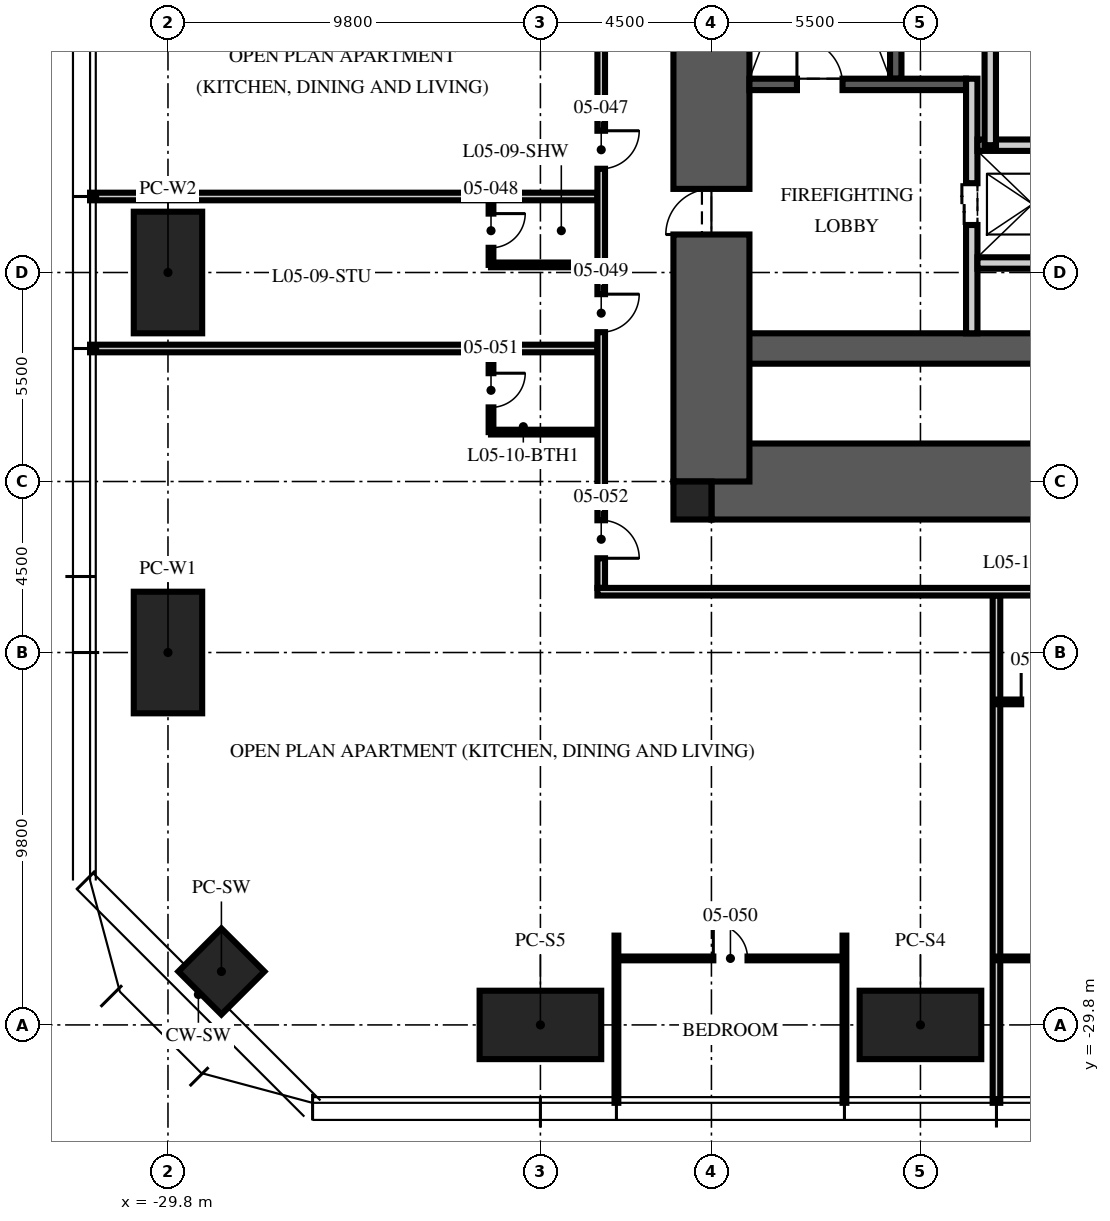
"""IFC4 building model, lengths in metres.
Left out: names, types, materials, properties, quantities, classifications, styles, units other than length and angle.
Written with IfcOpenShell. Run it as: python <this file> out.ifc"""

import sys

from ifc_helpers import new_model, si_unit, direction, frame, frame_2d, origin, origin_2d, place, context, subcontext, project, spatial, rectangle, hollow_rectangle, extrude, element, fill, save


model = new_model("IFC4")
c1 = context("Model", 3, precision=1e-05, world=origin(), true_north=direction((0.0, 1.0)))
c2 = subcontext(c1, "Body", "Model", "MODEL_VIEW")
j1 = project(units=[si_unit("LENGTHUNIT", "METRE"), si_unit("PLANEANGLEUNIT", "RADIAN")], contexts=[c1])
p1 = place(None, origin())
s1 = spatial("IfcSite", under=j1, at=p1, CompositionType="ELEMENT")
p2 = place(p1, origin())
s2 = spatial("IfcBuilding", under=s1, at=p2, CompositionType="ELEMENT")
p3 = place(p2, frame((0.0, 0.0, 24.75)))
s3 = spatial("IfcBuildingStorey", under=s2, at=p3, CompositionType="ELEMENT", Elevation=24.75)
p4 = place(p3, frame((-15.5, -15.5, -0.25), z_axis=(0.0, 0.0, 1.0), x_axis=(1.0, 0.0, 0.0)))
e1 = element("IfcWall", 1, at=p4, inside=s3, PredefinedType="SHEAR", context=c2, shape_type="SweptSolid", body=[
    extrude(rectangle(XDim=31.0, YDim=2.0, at=frame_2d((15.5, 0.0))), origin(), (0.0, 0.0, 1.0), 3.75),
])
p5 = place(p3, frame((-15.5, -12.0, -0.25), z_axis=(0.0, 0.0, 1.0), x_axis=(1.0, 0.0, 0.0)))
e2 = element("IfcWall", 2, at=p5, inside=s3, PredefinedType="SHEAR", context=c2, shape_type="SweptSolid", body=[
    extrude(rectangle(XDim=31.0, YDim=0.8, at=frame_2d((15.5, 0.0))), origin(), (0.0, 0.0, 1.0), 3.75),
])
p6 = place(p3, frame((-15.5, -15.5, -0.25), z_axis=(0.0, 0.0, 1.0), x_axis=(0.0, 1.0, 0.0)))
e3 = element("IfcWall", 3, at=p6, inside=s3, PredefinedType="SHEAR", context=c2, shape_type="SweptSolid", body=[
    extrude(rectangle(XDim=31.0, YDim=2.0, at=frame_2d((15.5, 0.0))), origin(), (0.0, 0.0, 1.0), 3.75),
])
p7 = place(p6, frame((6.5, 0.0, 0.25)))
e4 = element("IfcOpeningElement", 4, at=p7, cuts=e3, PredefinedType="OPENING", context=c2, shape_type="SweptSolid", body=[
    extrude(rectangle(XDim=1.2, YDim=2.1, at=frame_2d((0.6, 1.05))), frame((0.0, 1.01, 0.0), z_axis=(0.0, -1.0, 0.0), x_axis=(1.0, 0.0, 0.0)), (0.0, 0.0, 1.0), 2.02),
])
p8 = place(p6, frame((23.0, 0.0, 0.25)))
e5 = element("IfcOpeningElement", 5, at=p8, cuts=e3, PredefinedType="OPENING", context=c2, shape_type="SweptSolid", body=[
    extrude(rectangle(XDim=1.8, YDim=2.1, at=frame_2d((0.9, 1.05))), frame((0.0, 1.01, 0.0), z_axis=(0.0, -1.0, 0.0), x_axis=(1.0, 0.0, 0.0)), (0.0, 0.0, 1.0), 2.02),
])
p9 = place(p3, frame((-16.0, -16.0, -0.25), z_axis=(0.0, 0.0, 1.0), x_axis=(1.0, 0.0, 0.0)))
e6 = element("IfcColumn", 6, at=p9, inside=s3, PredefinedType="COLUMN", context=c2, shape_type="SweptSolid", body=[
    extrude(rectangle(XDim=1.0, YDim=1.0, at=origin_2d()), origin(), (0.0, 0.0, 1.0), 3.75),
])
for number, where, z_axis, x_axis in (
    (7, (-10.0, -29.8, 0.0), (0.0, 0.0, 1.0), (1.0, 0.0, 0.0)),
    (8, (-20.0, -29.8, 0.0), (0.0, 0.0, 1.0), (1.0, 0.0, 0.0)),
    (9, (-29.8, -20.0, 0.0), (0.0, 0.0, 1.0), (0.0, 1.0, 0.0)),
    (10, (-29.8, -10.0, 0.0), (0.0, 0.0, 1.0), (0.0, 1.0, 0.0)),
):
    element("IfcColumn", number, at=place(p3, frame(where, z_axis=z_axis, x_axis=x_axis)), inside=s3, PredefinedType="COLUMN", context=c2, shape_type="SweptSolid", body=[
        extrude(hollow_rectangle(XDim=3.2, YDim=1.8, WallThickness=0.2, at=origin_2d()), origin(), (0.0, 0.0, 1.0), 3.75),
    ])
p10 = place(p3, frame((-28.394, -28.394, 0.0), z_axis=(0.0, 0.0, 1.0), x_axis=(0.707106781187, -0.707106781187, 0.0)))
e11 = element("IfcColumn", 11, at=p10, inside=s3, PredefinedType="COLUMN", context=c2, shape_type="SweptSolid", body=[
    extrude(hollow_rectangle(XDim=1.6, YDim=1.6, WallThickness=0.1, at=origin_2d()), origin(), (0.0, 0.0, 1.0), 3.75),
])
p11 = place(p3, frame((-10.65, -4.9, 0.0), z_axis=(0.0, 0.0, 1.0), x_axis=(0.0, 1.0, 0.0)))
e12 = element("IfcWall", 12, at=p11, inside=s3, PredefinedType="SOLIDWALL", context=c2, shape_type="SweptSolid", body=[
    extrude(rectangle(XDim=10.1, YDim=0.3, at=frame_2d((5.05, 0.0))), origin(), (0.0, 0.0, 1.0), 3.5),
])
p12 = place(p3, frame((-14.5, -5.05, 0.0), z_axis=(0.0, 0.0, 1.0), x_axis=(1.0, 0.0, 0.0)))
e13 = element("IfcWall", 13, at=p12, inside=s3, PredefinedType="SOLIDWALL", context=c2, shape_type="SweptSolid", body=[
    extrude(rectangle(XDim=5.7, YDim=0.3, at=frame_2d((2.85, 0.0))), origin(), (0.0, 0.0, 1.0), 3.5),
])
p13 = place(p12, frame((1.25, 0.0, 0.0)))
e14 = element("IfcOpeningElement", 14, at=p13, cuts=e13, PredefinedType="OPENING", context=c2, shape_type="SweptSolid", body=[
    extrude(rectangle(XDim=1.2, YDim=2.1, at=frame_2d((0.6, 1.05))), frame((0.0, 0.16, 0.0), z_axis=(0.0, -1.0, 0.0), x_axis=(1.0, 0.0, 0.0)), (0.0, 0.0, 1.0), 0.32),
])
p14 = place(p3, frame((-8.65, -11.6, 0.0), z_axis=(0.0, 0.0, 1.0), x_axis=(0.0, 1.0, 0.0)))
e15 = element("IfcWall", 15, at=p14, inside=s3, PredefinedType="PARTITIONING", context=c2, shape_type="SweptSolid", body=[
    extrude(rectangle(XDim=6.7, YDim=0.3, at=frame_2d((3.35, 0.0))), origin(), (0.0, 0.0, 1.0), 3.5),
])
p15 = place(p14, frame((2.85, 0.0, 0.0)))
e16 = element("IfcOpeningElement", 16, at=p15, cuts=e15, PredefinedType="OPENING", context=c2, shape_type="SweptSolid", body=[
    extrude(rectangle(XDim=1.1, YDim=2.1, at=frame_2d((0.55, 1.05))), frame((0.0, 0.16, 0.0), z_axis=(0.0, -1.0, 0.0), x_axis=(1.0, 0.0, 0.0)), (0.0, 0.0, 1.0), 0.32),
])
p16 = place(p3, frame((-8.5, -6.65, 0.0), z_axis=(0.0, 0.0, 1.0), x_axis=(1.0, 0.0, 0.0)))
e17 = element("IfcWall", 17, at=p16, inside=s3, PredefinedType="PARTITIONING", context=c2, shape_type="SweptSolid", body=[
    extrude(rectangle(XDim=17.0, YDim=0.3, at=frame_2d((8.5, 0.0))), origin(), (0.0, 0.0, 1.0), 3.5),
])
p17 = place(p16, frame((7.8, 0.0, 0.0)))
e18 = element("IfcOpeningElement", 18, at=p17, cuts=e17, PredefinedType="OPENING", context=c2, shape_type="SweptSolid", body=[
    extrude(rectangle(XDim=1.3, YDim=2.4, at=frame_2d((0.65, 1.2))), frame((0.0, 0.16, 0.0), z_axis=(0.0, -1.0, 0.0), x_axis=(1.0, 0.0, 0.0)), (0.0, 0.0, 1.0), 0.32),
])
p18 = place(p16, frame((5.65, 0.0, 0.0)))
e19 = element("IfcOpeningElement", 19, at=p18, cuts=e17, PredefinedType="OPENING", context=c2, shape_type="SweptSolid", body=[
    extrude(rectangle(XDim=0.9, YDim=2.1, at=frame_2d((0.45, 1.05))), frame((0.0, 0.16, 0.0), z_axis=(0.0, -1.0, 0.0), x_axis=(1.0, 0.0, 0.0)), (0.0, 0.0, 1.0), 0.32),
])
p19 = place(p16, frame((10.4, 0.0, 0.0)))
e20 = element("IfcOpeningElement", 20, at=p19, cuts=e17, PredefinedType="OPENING", context=c2, shape_type="SweptSolid", body=[
    extrude(rectangle(XDim=0.9, YDim=2.1, at=frame_2d((0.45, 1.05))), frame((0.0, 0.16, 0.0), z_axis=(0.0, -1.0, 0.0), x_axis=(1.0, 0.0, 0.0)), (0.0, 0.0, 1.0), 0.32),
])
p20 = place(p3, frame((-8.5, -9.75, 0.0), z_axis=(0.0, 0.0, 1.0), x_axis=(1.0, 0.0, 0.0)))
e21 = element("IfcWall", 21, at=p20, inside=s3, PredefinedType="PARTITIONING", context=c2, shape_type="SweptSolid", body=[
    extrude(rectangle(XDim=2.9, YDim=0.3, at=frame_2d((1.45, 0.0))), origin(), (0.0, 0.0, 1.0), 3.5),
])
p21 = place(p3, frame((-8.163, -6.65, 0.0), z_axis=(0.0, 0.0, 1.0), x_axis=(0.0, 1.0, 0.0)))
e22 = element("IfcWall", 22, at=p21, inside=s3, PredefinedType="PARTITIONING", context=c2, shape_type="SweptSolid", body=[
    extrude(rectangle(XDim=7.45, YDim=0.3, at=frame_2d((3.725, 0.0))), origin(), (0.0, 0.0, 1.0), 3.5),
])
for number, where, z_axis, x_axis in (
    (23, (-18.5, -8.0, 0.0), (0.0, 0.0, 1.0), (-1.0, 0.0, 0.0)),
    (24, (-18.5, -12.0, 0.0), (0.0, 0.0, 1.0), (-1.0, 0.0, 0.0)),
):
    element("IfcWall", number, at=place(p3, frame(where, z_axis=z_axis, x_axis=x_axis)), inside=s3, PredefinedType="PARTITIONING", context=c2, shape_type="SweptSolid", body=[
        extrude(rectangle(XDim=13.35, YDim=0.2, at=frame_2d((6.675, 0.0))), origin(), (0.0, 0.0, 1.0), 2.71),
    ])
for number, where, z_axis, x_axis in (
    (25, (-18.0, -27.45, 0.0), (0.0, 0.0, 1.0), (0.0, -1.0, 0.0)),
    (26, (-12.0, -27.45, 0.0), (0.0, 0.0, 1.0), (0.0, -1.0, 0.0)),
):
    element("IfcWall", number, at=place(p3, frame(where, z_axis=z_axis, x_axis=x_axis)), inside=s3, PredefinedType="PARTITIONING", context=c2, shape_type="SweptSolid", body=[
        extrude(rectangle(XDim=4.4, YDim=0.1, at=frame_2d((2.2, 0.0))), origin(), (0.0, 0.0, 1.0), 2.71),
    ])
p22 = place(p3, frame((-8.0, -18.5, 0.0), z_axis=(0.0, 0.0, 1.0), x_axis=(0.0, -1.0, 0.0)))
e27 = element("IfcWall", 27, at=p22, inside=s3, PredefinedType="PARTITIONING", context=c2, shape_type="SweptSolid", body=[
    extrude(rectangle(XDim=13.35, YDim=0.2, at=frame_2d((6.675, 0.0))), origin(), (0.0, 0.0, 1.0), 2.71),
])
p23 = place(p3, frame((-21.3, -8.0, 0.0), z_axis=(0.0, 0.0, 1.0), x_axis=(0.0, -1.0, 0.0)))
e28 = element("IfcWall", 28, at=p23, inside=s3, PredefinedType="PARTITIONING", context=c2, shape_type="SweptSolid", body=[
    extrude(rectangle(XDim=1.8, YDim=0.125, at=frame_2d((0.9, 0.0))), origin(), (0.0, 0.0, 1.0), 3.5),
])
p24 = place(p23, frame((0.45, 0.0, 0.0)))
e29 = element("IfcOpeningElement", 29, at=p24, cuts=e28, PredefinedType="OPENING", context=c2, shape_type="SweptSolid", body=[
    extrude(rectangle(XDim=0.9, YDim=2.1, at=frame_2d((0.45, 1.05))), frame((0.0, 0.073, 0.0), z_axis=(0.0, -1.0, 0.0), x_axis=(1.0, 0.0, 0.0)), (0.0, 0.0, 1.0), 0.145),
])
p25 = place(p3, frame((-18.5, -9.8, 0.0), z_axis=(0.0, 0.0, 1.0), x_axis=(-1.0, 0.0, 0.0)))
e30 = element("IfcWall", 30, at=p25, inside=s3, PredefinedType="PARTITIONING", context=c2, shape_type="SweptSolid", body=[
    extrude(rectangle(XDim=2.8, YDim=0.125, at=frame_2d((1.4, 0.0))), origin(), (0.0, 0.0, 1.0), 2.492),
])
p26 = place(p3, frame((-18.0, -28.05, 0.0), z_axis=(0.0, 0.0, 1.0), x_axis=(1.0, 0.0, 0.0)))
e31 = element("IfcWall", 31, at=p26, inside=s3, PredefinedType="PARTITIONING", context=c2, shape_type="SweptSolid", body=[
    extrude(rectangle(XDim=6.0, YDim=0.1, at=frame_2d((3.0, 0.0))), origin(), (0.0, 0.0, 1.0), 2.61),
])
p27 = place(p26, frame((2.55, 0.0, 0.0)))
e32 = element("IfcOpeningElement", 32, at=p27, cuts=e31, PredefinedType="OPENING", context=c2, shape_type="SweptSolid", body=[
    extrude(rectangle(XDim=0.9, YDim=2.1, at=frame_2d((0.45, 1.05))), frame((0.0, 0.06, 0.0), z_axis=(0.0, -1.0, 0.0), x_axis=(1.0, 0.0, 0.0)), (0.0, 0.0, 1.0), 0.12),
])
p28 = place(p3, frame((-21.3, -12.0, 0.0), z_axis=(0.0, 0.0, 1.0), x_axis=(0.0, -1.0, 0.0)))
e33 = element("IfcWall", 33, at=p28, inside=s3, PredefinedType="PARTITIONING", context=c2, shape_type="SweptSolid", body=[
    extrude(rectangle(XDim=2.2, YDim=0.125, at=frame_2d((1.1, 0.0))), origin(), (0.0, 0.0, 1.0), 3.5),
])
p29 = place(p28, frame((0.65, 0.0, 0.0)))
e34 = element("IfcOpeningElement", 34, at=p29, cuts=e33, PredefinedType="OPENING", context=c2, shape_type="SweptSolid", body=[
    extrude(rectangle(XDim=0.9, YDim=2.1, at=frame_2d((0.45, 1.05))), frame((0.0, 0.073, 0.0), z_axis=(0.0, -1.0, 0.0), x_axis=(1.0, 0.0, 0.0)), (0.0, 0.0, 1.0), 0.145),
])
p30 = place(p3, frame((-18.5, -14.2, 0.0), z_axis=(0.0, 0.0, 1.0), x_axis=(-1.0, 0.0, 0.0)))
e35 = element("IfcWall", 35, at=p30, inside=s3, PredefinedType="PARTITIONING", context=c2, shape_type="SweptSolid", body=[
    extrude(rectangle(XDim=2.8, YDim=0.125, at=frame_2d((1.4, 0.0))), origin(), (0.0, 0.0, 1.0), 3.5),
])
p31 = place(p3, frame((-8.0, -28.05, 0.0), z_axis=(0.0, 0.0, 1.0), x_axis=(1.0, 0.0, 0.0)))
e36 = element("IfcWall", 36, at=p31, inside=s3, PredefinedType="PARTITIONING", context=c2, shape_type="SweptSolid", body=[
    extrude(rectangle(XDim=6.0, YDim=0.1, at=frame_2d((3.0, 0.0))), origin(), (0.0, 0.0, 1.0), 2.61),
])
p32 = place(p31, frame((2.55, 0.0, 0.0)))
e37 = element("IfcOpeningElement", 37, at=p32, cuts=e36, PredefinedType="OPENING", context=c2, shape_type="SweptSolid", body=[
    extrude(rectangle(XDim=0.9, YDim=2.1, at=frame_2d((0.45, 1.05))), frame((0.0, 0.06, 0.0), z_axis=(0.0, -1.0, 0.0), x_axis=(1.0, 0.0, 0.0)), (0.0, 0.0, 1.0), 0.12),
])
p33 = place(p3, frame((-8.0, -21.3, 0.0), z_axis=(0.0, 0.0, 1.0), x_axis=(1.0, 0.0, 0.0)))
e38 = element("IfcWall", 38, at=p33, inside=s3, PredefinedType="PARTITIONING", context=c2, shape_type="SweptSolid", body=[
    extrude(rectangle(XDim=2.2, YDim=0.125, at=frame_2d((1.1, 0.0))), origin(), (0.0, 0.0, 1.0), 3.5),
])
p34 = place(p33, frame((0.65, 0.0, 0.0)))
e39 = element("IfcOpeningElement", 39, at=p34, cuts=e38, PredefinedType="OPENING", context=c2, shape_type="SweptSolid", body=[
    extrude(rectangle(XDim=0.9, YDim=2.1, at=frame_2d((0.45, 1.05))), frame((0.0, 0.073, 0.0), z_axis=(0.0, -1.0, 0.0), x_axis=(1.0, 0.0, 0.0)), (0.0, 0.0, 1.0), 0.145),
])
p35 = place(p3, frame((-18.4, 18.3, 0.0), z_axis=(0.0, 0.0, 1.0), x_axis=(0.0, -1.0, 0.0)))
e40 = element("IfcWall", 40, at=p35, inside=s3, PredefinedType="PARTITIONING", context=c2, shape_type="SweptSolid", body=[
    extrude(rectangle(XDim=36.6, YDim=0.2, at=frame_2d((18.3, 0.0))), origin(), (0.0, 0.0, 1.0), 2.3),
])
p36 = place(p35, frame((8.57, 0.0, 0.0)))
e41 = element("IfcOpeningElement", 41, at=p36, cuts=e40, PredefinedType="OPENING", context=c2, shape_type="SweptSolid", body=[
    extrude(rectangle(XDim=1.0, YDim=2.2, at=frame_2d((0.5, 1.1))), frame((0.0, 0.11, 0.0), z_axis=(0.0, -1.0, 0.0), x_axis=(1.0, 0.0, 0.0)), (0.0, 0.0, 1.0), 0.22),
])
p37 = place(p35, frame((24.57, 0.0, 0.0)))
e42 = element("IfcOpeningElement", 42, at=p37, cuts=e40, PredefinedType="OPENING", context=c2, shape_type="SweptSolid", body=[
    extrude(rectangle(XDim=1.0, YDim=2.2, at=frame_2d((0.5, 1.1))), frame((0.0, 0.11, 0.0), z_axis=(0.0, -1.0, 0.0), x_axis=(1.0, 0.0, 0.0)), (0.0, 0.0, 1.0), 0.22),
])
p38 = place(p35, frame((28.87, 0.0, 0.0)))
e43 = element("IfcOpeningElement", 43, at=p38, cuts=e40, PredefinedType="OPENING", context=c2, shape_type="SweptSolid", body=[
    extrude(rectangle(XDim=1.0, YDim=2.2, at=frame_2d((0.5, 1.1))), frame((0.0, 0.11, 0.0), z_axis=(0.0, -1.0, 0.0), x_axis=(1.0, 0.0, 0.0)), (0.0, 0.0, 1.0), 0.22),
])
p39 = place(p35, frame((34.82, 0.0, 0.0)))
e44 = element("IfcOpeningElement", 44, at=p39, cuts=e40, PredefinedType="OPENING", context=c2, shape_type="SweptSolid", body=[
    extrude(rectangle(XDim=1.0, YDim=2.2, at=frame_2d((0.5, 1.1))), frame((0.0, 0.11, 0.0), z_axis=(0.0, -1.0, 0.0), x_axis=(1.0, 0.0, 0.0)), (0.0, 0.0, 1.0), 0.22),
])
p40 = place(p3, frame((18.5, -18.4, 0.0), z_axis=(0.0, 0.0, 1.0), x_axis=(-1.0, 0.0, 0.0)))
e45 = element("IfcWall", 45, at=p40, inside=s3, PredefinedType="PARTITIONING", context=c2, shape_type="SweptSolid", body=[
    extrude(rectangle(XDim=37.0, YDim=0.2, at=frame_2d((18.5, 0.0))), origin(), (0.0, 0.0, 1.0), 2.3),
])
p41 = place(p40, frame((17.23, 0.0, 0.0)))
e46 = element("IfcOpeningElement", 46, at=p41, cuts=e45, PredefinedType="OPENING", context=c2, shape_type="SweptSolid", body=[
    extrude(rectangle(XDim=1.0, YDim=2.2, at=frame_2d((0.5, 1.1))), frame((0.0, 0.11, 0.0), z_axis=(0.0, -1.0, 0.0), x_axis=(1.0, 0.0, 0.0)), (0.0, 0.0, 1.0), 0.22),
])
p42 = place(p40, frame((7.23, 0.0, 0.0)))
e47 = element("IfcOpeningElement", 47, at=p42, cuts=e45, PredefinedType="OPENING", context=c2, shape_type="SweptSolid", body=[
    extrude(rectangle(XDim=1.0, YDim=2.2, at=frame_2d((0.5, 1.1))), frame((0.0, 0.11, 0.0), z_axis=(0.0, -1.0, 0.0), x_axis=(1.0, 0.0, 0.0)), (0.0, 0.0, 1.0), 0.22),
])
p43 = place(p40, frame((0.93, 0.0, 0.0)))
e48 = element("IfcOpeningElement", 48, at=p43, cuts=e45, PredefinedType="OPENING", context=c2, shape_type="SweptSolid", body=[
    extrude(rectangle(XDim=1.0, YDim=2.2, at=frame_2d((0.5, 1.1))), frame((0.0, 0.11, 0.0), z_axis=(0.0, -1.0, 0.0), x_axis=(1.0, 0.0, 0.0)), (0.0, 0.0, 1.0), 0.22),
])
p44 = place(p13, origin())
e49 = element("IfcDoor", 49, at=p44, inside=s3, OperationType="SINGLE_SWING_LEFT", PredefinedType="DOOR", context=c2, shape_type="SweptSolid", body=[
    extrude(rectangle(XDim=1.2, YDim=2.1, at=frame_2d((0.6, 1.05))), frame((0.0, 0.025, 0.0), z_axis=(0.0, -1.0, 0.0), x_axis=(1.0, 0.0, 0.0)), (0.0, 0.0, 1.0), 0.05),
])
fill(e14, e49)
p45 = place(p7, origin())
e50 = element("IfcDoor", 50, at=p45, inside=s3, OperationType="SINGLE_SWING_LEFT", PredefinedType="DOOR", context=c2, shape_type="SweptSolid", body=[
    extrude(rectangle(XDim=1.2, YDim=2.1, at=frame_2d((0.6, 1.05))), frame((0.0, 0.025, 0.0), z_axis=(0.0, -1.0, 0.0), x_axis=(1.0, 0.0, 0.0)), (0.0, 0.0, 1.0), 0.05),
])
fill(e4, e50)
p46 = place(p15, origin())
e51 = element("IfcDoor", 51, at=p46, inside=s3, OperationType="DOUBLE_DOOR_SLIDING", PredefinedType="DOOR", context=c2, shape_type="SweptSolid", body=[
    extrude(rectangle(XDim=1.1, YDim=2.1, at=frame_2d((0.55, 1.05))), frame((0.0, 0.025, 0.0), z_axis=(0.0, -1.0, 0.0), x_axis=(1.0, 0.0, 0.0)), (0.0, 0.0, 1.0), 0.05),
])
fill(e16, e51)
p47 = place(p37, origin())
e52 = element("IfcDoor", 52, at=p47, inside=s3, OperationType="SINGLE_SWING_LEFT", PredefinedType="DOOR", context=c2, shape_type="SweptSolid", body=[
    extrude(rectangle(XDim=1.0, YDim=2.2, at=frame_2d((0.5, 1.1))), frame((0.0, 0.025, 0.0), z_axis=(0.0, -1.0, 0.0), x_axis=(1.0, 0.0, 0.0)), (0.0, 0.0, 1.0), 0.05),
])
fill(e42, e52)
p48 = place(p24, origin())
e53 = element("IfcDoor", 53, at=p48, inside=s3, OperationType="SINGLE_SWING_LEFT", PredefinedType="DOOR", context=c2, shape_type="SweptSolid", body=[
    extrude(rectangle(XDim=0.9, YDim=2.1, at=frame_2d((0.45, 1.05))), frame((0.0, 0.025, 0.0), z_axis=(0.0, -1.0, 0.0), x_axis=(1.0, 0.0, 0.0)), (0.0, 0.0, 1.0), 0.05),
])
fill(e29, e53)
p49 = place(p38, origin())
e54 = element("IfcDoor", 54, at=p49, inside=s3, OperationType="SINGLE_SWING_LEFT", PredefinedType="DOOR", context=c2, shape_type="SweptSolid", body=[
    extrude(rectangle(XDim=1.0, YDim=2.2, at=frame_2d((0.5, 1.1))), frame((0.0, 0.025, 0.0), z_axis=(0.0, -1.0, 0.0), x_axis=(1.0, 0.0, 0.0)), (0.0, 0.0, 1.0), 0.05),
])
fill(e43, e54)
p50 = place(p27, origin())
e55 = element("IfcDoor", 55, at=p50, inside=s3, OperationType="SINGLE_SWING_LEFT", PredefinedType="DOOR", context=c2, shape_type="SweptSolid", body=[
    extrude(rectangle(XDim=0.9, YDim=2.1, at=frame_2d((0.45, 1.05))), frame((0.0, 0.025, 0.0), z_axis=(0.0, -1.0, 0.0), x_axis=(1.0, 0.0, 0.0)), (0.0, 0.0, 1.0), 0.05),
])
fill(e32, e55)
p51 = place(p29, origin())
e56 = element("IfcDoor", 56, at=p51, inside=s3, OperationType="SINGLE_SWING_LEFT", PredefinedType="DOOR", context=c2, shape_type="SweptSolid", body=[
    extrude(rectangle(XDim=0.9, YDim=2.1, at=frame_2d((0.45, 1.05))), frame((0.0, 0.025, 0.0), z_axis=(0.0, -1.0, 0.0), x_axis=(1.0, 0.0, 0.0)), (0.0, 0.0, 1.0), 0.05),
])
fill(e34, e56)
p52 = place(p39, origin())
e57 = element("IfcDoor", 57, at=p52, inside=s3, OperationType="SINGLE_SWING_RIGHT", PredefinedType="DOOR", context=c2, shape_type="SweptSolid", body=[
    extrude(rectangle(XDim=1.0, YDim=2.2, at=frame_2d((0.5, 1.1))), frame((0.0, 0.025, 0.0), z_axis=(0.0, -1.0, 0.0), x_axis=(1.0, 0.0, 0.0)), (0.0, 0.0, 1.0), 0.05),
])
fill(e44, e57)
p53 = place(p34, origin())
e58 = element("IfcDoor", 58, at=p53, inside=s3, OperationType="SINGLE_SWING_LEFT", PredefinedType="DOOR", context=c2, shape_type="SweptSolid", body=[
    extrude(rectangle(XDim=0.9, YDim=2.1, at=frame_2d((0.45, 1.05))), frame((0.0, 0.025, 0.0), z_axis=(0.0, -1.0, 0.0), x_axis=(1.0, 0.0, 0.0)), (0.0, 0.0, 1.0), 0.05),
])
fill(e39, e58)
save(model, sys.argv[1])
